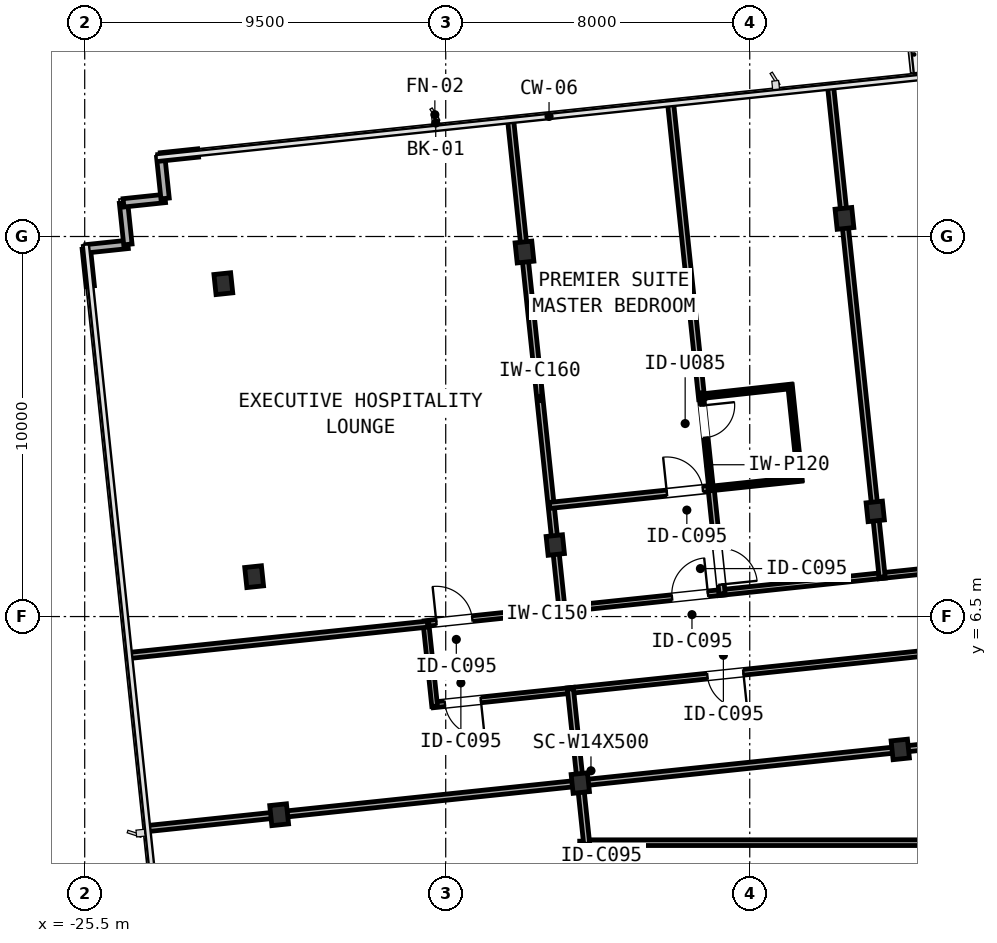
"""IFC4 building model, lengths in metres.
Left out: names, types, materials, properties, quantities, classifications, styles, units other than length and angle.
Written with IfcOpenShell. Run it as: python <this file> out.ifc"""

import sys

from ifc_helpers import new_model, si_unit, direction, frame, frame_2d, origin, origin_2d, place, context, subcontext, project, spatial, rectangle, i_section, extrude, element, fill, save


model = new_model("IFC4")
c1 = context("Model", 3, precision=1e-05, world=origin(), true_north=direction((0.0, 1.0)))
c2 = subcontext(c1, "Body", "Model", "MODEL_VIEW")
j1 = project(units=[si_unit("LENGTHUNIT", "METRE"), si_unit("PLANEANGLEUNIT", "RADIAN")], contexts=[c1])
p1 = place(None, origin())
s1 = spatial("IfcSite", under=j1, at=p1, CompositionType="ELEMENT")
p2 = place(p1, origin())
s2 = spatial("IfcBuilding", under=s1, at=p2, CompositionType="ELEMENT")
p3 = place(p2, frame((0.0, 0.0, 106.35)))
s3 = spatial("IfcBuildingStorey", under=s2, at=p3, CompositionType="ELEMENT", Elevation=106.35)
for number, where, z_axis, x_axis in (
    (1, (-20.383, 1.286, 0.0), (0.0, 0.0, 1.0), (0.995, 0.105, 0.0)),
    (2, (-21.042, 7.549, 0.0), (0.0, 0.0, 1.0), (0.995, 0.105, 0.0)),
    (3, (-21.852, 15.259, 0.0), (0.0, 0.0, 1.0), (0.995, 0.105, 0.0)),
):
    element("IfcColumn", number, at=place(p3, frame(where, z_axis=z_axis, x_axis=x_axis)), inside=s3, PredefinedType="COLUMN", context=c2, shape_type="SweptSolid", body=[
        extrude(i_section(OverallWidth=0.442, OverallDepth=0.531, WebThickness=0.066, FlangeThickness=0.106, FilletRadius=0.031, at=origin_2d()), origin(), (0.0, 0.0, 1.0), 3.45),
    ])
for number, where, z_axis, x_axis in (
    (4, (-12.459, 2.119, 0.0), (0.0, 0.0, 1.0), (0.995, 0.105, 0.0)),
    (5, (-13.117, 8.382, 0.0), (0.0, 0.0, 1.0), (0.995, 0.105, 0.0)),
):
    element("IfcColumn", number, at=place(p3, frame(where, z_axis=z_axis, x_axis=x_axis)), inside=s3, PredefinedType="COLUMN", context=c2, shape_type="SweptSolid", body=[
        extrude(i_section(OverallWidth=0.432, OverallDepth=0.498, WebThickness=0.056, FlangeThickness=0.089, FilletRadius=0.031, at=origin_2d()), origin(), (0.0, 0.0, 1.0), 3.45),
    ])
p4 = place(p3, frame((-13.927, 16.092, 0.0), z_axis=(0.0, 0.0, 1.0), x_axis=(0.994521895368, 0.104528463268, 0.0)))
e6 = element("IfcColumn", 6, at=p4, inside=s3, PredefinedType="COLUMN", context=c2, shape_type="SweptSolid", body=[
    extrude(i_section(OverallWidth=0.442, OverallDepth=0.531, WebThickness=0.066, FlangeThickness=0.106, FilletRadius=0.031, at=origin_2d()), origin(), (0.0, 0.0, 1.0), 3.45),
])
for number, where, z_axis, x_axis in (
    (7, (-4.039, 3.004, 0.0), (0.0, 0.0, 1.0), (0.995, 0.105, 0.0)),
    (8, (-4.698, 9.267, 0.0), (0.0, 0.0, 1.0), (0.995, 0.105, 0.0)),
):
    element("IfcColumn", number, at=place(p3, frame(where, z_axis=z_axis, x_axis=x_axis)), inside=s3, PredefinedType="COLUMN", context=c2, shape_type="SweptSolid", body=[
        extrude(i_section(OverallWidth=0.432, OverallDepth=0.498, WebThickness=0.056, FlangeThickness=0.089, FilletRadius=0.031, at=origin_2d()), origin(), (0.0, 0.0, 1.0), 3.45),
    ])
p5 = place(p3, frame((-5.508, 16.977, 0.0), z_axis=(0.0, 0.0, 1.0), x_axis=(0.994521895368, 0.104528463268, 0.0)))
e9 = element("IfcColumn", 9, at=p5, inside=s3, PredefinedType="COLUMN", context=c2, shape_type="SweptSolid", body=[
    extrude(i_section(OverallWidth=0.442, OverallDepth=0.531, WebThickness=0.066, FlangeThickness=0.106, FilletRadius=0.031, at=origin_2d()), origin(), (0.0, 0.0, 1.0), 3.45),
])
p6 = place(p3, frame((-25.354, 15.192, 0.0), z_axis=(0.0, 0.0, 1.0), x_axis=(-0.104556418955, 0.99451895671, 0.0)))
e10 = element("IfcWall", 10, at=p6, inside=s3, PredefinedType="STANDARD", context=c2, shape_type="SweptSolid", body=[
    extrude(rectangle(XDim=0.99, YDim=0.22, at=frame_2d((0.495, 0.0))), origin(), (0.0, 0.0, 1.0), 3.19),
])
p7 = place(p3, frame((-25.458, 16.177, 0.0), z_axis=(0.0, 0.0, 1.0), x_axis=(0.994521251134, 0.104534592565, 0.0)))
e11 = element("IfcWall", 11, at=p7, inside=s3, PredefinedType="STANDARD", context=c2, shape_type="SweptSolid", body=[
    extrude(rectangle(XDim=1.1, YDim=0.22, at=frame_2d((0.55, 0.0))), origin(), (0.0, 0.0, 1.0), 3.19),
])
p8 = place(p3, frame((-24.364, 16.292, 0.0), z_axis=(0.0, 0.0, 1.0), x_axis=(-0.104557671117, 0.994518825066, 0.0)))
e12 = element("IfcWall", 12, at=p8, inside=s3, PredefinedType="STANDARD", context=c2, shape_type="SweptSolid", body=[
    extrude(rectangle(XDim=1.1, YDim=0.22, at=frame_2d((0.55, 0.0))), origin(), (0.0, 0.0, 1.0), 3.19),
])
for number, where, z_axis, x_axis in (
    (13, (-24.479, 17.386, 0.0), (0.0, 0.0, 1.0), (0.995, 0.105, 0.0)),
    (14, (-23.385, 17.501, 0.0), (0.0, 0.0, 1.0), (-0.105, 0.995, 0.0)),
):
    element("IfcWall", number, at=place(p3, frame(where, z_axis=z_axis, x_axis=x_axis)), inside=s3, PredefinedType="STANDARD", context=c2, shape_type="SweptSolid", body=[
        extrude(rectangle(XDim=1.1, YDim=0.22, at=frame_2d((0.55, 0.0))), origin(), (0.0, 0.0, 1.0), 3.19),
    ])
p9 = place(p3, frame((-23.5, 18.595, 0.0), z_axis=(0.0, 0.0, 1.0), x_axis=(0.99451895671, 0.104556418955, 0.0)))
e15 = element("IfcWall", 15, at=p9, inside=s3, PredefinedType="STANDARD", context=c2, shape_type="SweptSolid", body=[
    extrude(rectangle(XDim=0.99, YDim=0.22, at=frame_2d((0.495, 0.0))), origin(), (0.0, 0.0, 1.0), 3.19),
])
p10 = place(p3, frame((-16.56, 6.313, 0.0), z_axis=(0.0, 0.0, 1.0), x_axis=(0.994525204328, 0.104496975826, 0.0)))
e16 = element("IfcWall", 16, at=p10, inside=s3, PredefinedType="PARTITIONING", context=c2, shape_type="SweptSolid", body=[
    extrude(rectangle(XDim=3.722, YDim=0.15, at=frame_2d((1.861, 0.0))), origin(), (0.0, 0.0, 1.0), 2.479),
])
p11 = place(p10, frame((0.315, 0.0, 0.0)))
e17 = element("IfcOpeningElement", 17, at=p11, cuts=e16, PredefinedType="OPENING", context=c2, shape_type="SweptSolid", body=[
    extrude(rectangle(XDim=0.95, YDim=2.15, at=frame_2d((0.475, 1.075))), frame((0.0, 0.085, 0.0), z_axis=(0.0, -1.0, 0.0), x_axis=(1.0, 0.0, 0.0)), (0.0, 0.0, 1.0), 0.17),
])
p12 = place(p3, frame((-13.021, 6.685, 0.0), z_axis=(0.0, 0.0, 1.0), x_axis=(0.9945197426, 0.104548943463, 0.0)))
e18 = element("IfcWall", 18, at=p12, inside=s3, PredefinedType="PARTITIONING", context=c2, shape_type="SweptSolid", body=[
    extrude(rectangle(XDim=4.397, YDim=0.15, at=frame_2d((2.199, 0.0))), origin(), (0.0, 0.0, 1.0), 2.479),
])
p13 = place(p12, frame((2.993, 0.0, 0.0)))
e19 = element("IfcOpeningElement", 19, at=p13, cuts=e18, PredefinedType="OPENING", context=c2, shape_type="SweptSolid", body=[
    extrude(rectangle(XDim=0.95, YDim=2.15, at=frame_2d((0.475, 1.075))), frame((0.0, 0.085, 0.0), z_axis=(0.0, -1.0, 0.0), x_axis=(1.0, 0.0, 0.0)), (0.0, 0.0, 1.0), 0.17),
])
p14 = place(p3, frame((-8.811, 7.127, 0.0), z_axis=(0.0, 0.0, 1.0), x_axis=(0.994524907824, 0.104499797695, 0.0)))
e20 = element("IfcWall", 20, at=p14, inside=s3, PredefinedType="PARTITIONING", context=c2, shape_type="SweptSolid", body=[
    extrude(rectangle(XDim=4.397, YDim=0.15, at=frame_2d((2.198, 0.0))), origin(), (0.0, 0.0, 1.0), 2.479),
])
p15 = place(p3, frame((-4.602, 7.57, 0.0), z_axis=(0.0, 0.0, 1.0), x_axis=(0.994522888708, 0.104519011838, 0.0)))
e21 = element("IfcWall", 21, at=p15, inside=s3, PredefinedType="PARTITIONING", context=c2, shape_type="SweptSolid", body=[
    extrude(rectangle(XDim=17.096, YDim=0.15, at=frame_2d((8.548, 0.0))), origin(), (0.0, 0.0, 1.0), 2.479),
])
p16 = place(p15, frame((12.361, 0.0, 0.0)))
e22 = element("IfcOpeningElement", 22, at=p16, cuts=e21, PredefinedType="OPENING", context=c2, shape_type="SweptSolid", body=[
    extrude(rectangle(XDim=0.95, YDim=2.15, at=frame_2d((0.475, 1.075))), frame((0.0, 0.085, 0.0), z_axis=(0.0, -1.0, 0.0), x_axis=(1.0, 0.0, 0.0)), (0.0, 0.0, 1.0), 0.17),
])
p17 = place(p3, frame((-12.633, 4.564, 0.0), z_axis=(0.0, 0.0, 1.0), x_axis=(-0.994525920558, -0.104490159046, 0.0)))
e23 = element("IfcWall", 23, at=p17, inside=s3, PredefinedType="PARTITIONING", context=c2, shape_type="SweptSolid", body=[
    extrude(rectangle(XDim=3.722, YDim=0.15, at=frame_2d((1.861, 0.0))), origin(), (0.0, 0.0, 1.0), 2.479),
])
p18 = place(p17, frame((2.457, 0.0, 0.0)))
e24 = element("IfcOpeningElement", 24, at=p18, cuts=e23, PredefinedType="OPENING", context=c2, shape_type="SweptSolid", body=[
    extrude(rectangle(XDim=0.95, YDim=2.15, at=frame_2d((0.475, 1.075))), frame((0.0, 0.085, 0.0), z_axis=(0.0, -1.0, 0.0), x_axis=(1.0, 0.0, 0.0)), (0.0, 0.0, 1.0), 0.17),
])
p19 = place(p3, frame((-16.291, 4.139, 0.0), z_axis=(0.0, 0.0, 1.0), x_axis=(-0.104512255544, 0.994523598735, 0.0)))
e25 = element("IfcWall", 25, at=p19, inside=s3, PredefinedType="PARTITIONING", context=c2, shape_type="SweptSolid", body=[
    extrude(rectangle(XDim=2.21, YDim=0.15, at=frame_2d((1.105, 0.0))), origin(), (0.0, 0.0, 1.0), 3.19),
])
p20 = place(p3, frame((7.26, 6.655, 0.0), z_axis=(0.0, 0.0, 1.0), x_axis=(-0.994522421445, -0.104523457861, 0.0)))
e26 = element("IfcWall", 26, at=p20, inside=s3, PredefinedType="PARTITIONING", context=c2, shape_type="SweptSolid", body=[
    extrude(rectangle(XDim=20.167, YDim=0.15, at=frame_2d((10.083, 0.0))), origin(), (0.0, 0.0, 1.0), 2.479),
])
p21 = place(p20, frame((15.514, 0.0, 0.0)))
e27 = element("IfcOpeningElement", 27, at=p21, cuts=e26, PredefinedType="OPENING", context=c2, shape_type="SweptSolid", body=[
    extrude(rectangle(XDim=0.95, YDim=2.15, at=frame_2d((0.475, 1.075))), frame((0.0, 0.085, 0.0), z_axis=(0.0, -1.0, 0.0), x_axis=(1.0, 0.0, 0.0)), (0.0, 0.0, 1.0), 0.17),
])
p22 = place(p3, frame((-12.376, 0.55, 0.0), z_axis=(0.0, 0.0, 1.0), x_axis=(1.0, 0.0, 0.0)))
e28 = element("IfcWall", 28, at=p22, inside=s3, PredefinedType="PARTITIONING", context=c2, shape_type="SweptSolid", body=[
    extrude(rectangle(XDim=20.278, YDim=0.15, at=frame_2d((10.139, 0.0))), origin(), (0.0, 0.0, 1.0), 2.479),
])
p23 = place(p22, frame((12.209, 0.0, 0.0)))
e29 = element("IfcOpeningElement", 29, at=p23, cuts=e28, PredefinedType="OPENING", context=c2, shape_type="SweptSolid", body=[
    extrude(rectangle(XDim=0.95, YDim=2.15, at=frame_2d((0.475, 1.075))), frame((0.0, 0.085, 0.0), z_axis=(0.0, -1.0, 0.0), x_axis=(1.0, 0.0, 0.0)), (0.0, 0.0, 1.0), 0.17),
])
p24 = place(p3, frame((-12.4, -2.19, 0.0), z_axis=(0.0, 0.0, 1.0), x_axis=(0.0, 1.0, 0.0)))
e30 = element("IfcWall", 30, at=p24, inside=s3, PredefinedType="PARTITIONING", context=c2, shape_type="SweptSolid", body=[
    extrude(rectangle(XDim=2.78, YDim=0.15, at=frame_2d((1.39, 0.0))), origin(), (0.0, 0.0, 1.0), 2.225),
])
p25 = place(p24, frame((0.348, 0.0, 0.0)))
e31 = element("IfcOpeningElement", 31, at=p25, cuts=e30, PredefinedType="OPENING", context=c2, shape_type="SweptSolid", body=[
    extrude(rectangle(XDim=0.95, YDim=2.15, at=frame_2d((0.475, 1.075))), frame((0.0, 0.085, 0.0), z_axis=(0.0, -1.0, 0.0), x_axis=(1.0, 0.0, 0.0)), (0.0, 0.0, 1.0), 0.17),
])
p26 = place(p3, frame((-13.909, 15.917, 0.0), z_axis=(0.0, 0.0, 1.0), x_axis=(0.104523341075, -0.994522433719, 0.0)))
e32 = element("IfcWall", 32, at=p26, inside=s3, PredefinedType="PARTITIONING", context=c2, shape_type="SweptSolid", body=[
    extrude(rectangle(XDim=7.4, YDim=0.16, at=frame_2d((3.7, 0.0))), origin(), (0.0, 0.0, 1.0), 2.479),
])
p27 = place(p3, frame((-13.099, 8.207, 0.0), z_axis=(0.0, 0.0, 1.0), x_axis=(0.104578999325, -0.994516582516, 0.0)))
e33 = element("IfcWall", 33, at=p27, inside=s3, PredefinedType="PARTITIONING", context=c2, shape_type="SweptSolid", body=[
    extrude(rectangle(XDim=1.562, YDim=0.16, at=frame_2d((0.781, 0.0))), origin(), (0.0, 0.0, 1.0), 2.479),
])
p28 = place(p3, frame((-14.295, 19.592, 0.0), z_axis=(0.0, 0.0, 1.0), x_axis=(0.10455555946, -0.99451904707, 0.0)))
e34 = element("IfcWall", 34, at=p28, inside=s3, PredefinedType="PARTITIONING", context=c2, shape_type="SweptSolid", body=[
    extrude(rectangle(XDim=3.344, YDim=0.16, at=frame_2d((1.672, 0.0))), origin(), (0.0, 0.0, 1.0), 3.19),
])
p29 = place(p3, frame((-16.478, 6.302, 0.0), z_axis=(0.0, 0.0, 1.0), x_axis=(-0.994519786396, -0.104548526856, 0.0)))
e35 = element("IfcWall", 35, at=p29, inside=s3, PredefinedType="PARTITIONING", context=c2, shape_type="SweptSolid", body=[
    extrude(rectangle(XDim=7.928, YDim=0.16, at=frame_2d((3.964, 0.0))), origin(), (0.0, 0.0, 1.0), 2.553),
])
p30 = place(p3, frame((-13.267, 9.424, 0.0), z_axis=(0.0, 0.0, 1.0), x_axis=(0.994519401846, 0.104552184826, 0.0)))
e36 = element("IfcWall", 36, at=p30, inside=s3, PredefinedType="PARTITIONING", context=c2, shape_type="SweptSolid", body=[
    extrude(rectangle(XDim=4.313, YDim=0.16, at=frame_2d((2.156, 0.0))), origin(), (0.0, 0.0, 1.0), 2.479),
])
p31 = place(p30, frame((3.104, 0.0, 0.0)))
e37 = element("IfcOpeningElement", 37, at=p31, cuts=e36, PredefinedType="OPENING", context=c2, shape_type="SweptSolid", body=[
    extrude(rectangle(XDim=0.95, YDim=2.15, at=frame_2d((0.475, 1.075))), frame((0.0, 0.09, 0.0), z_axis=(0.0, -1.0, 0.0), x_axis=(1.0, 0.0, 0.0)), (0.0, 0.0, 1.0), 0.18),
])
p32 = place(p3, frame((-9.021, 9.911, 0.0), z_axis=(0.0, 0.0, 1.0), x_axis=(0.104559042439, -0.994518680892, 0.0)))
e38 = element("IfcWall", 38, at=p32, inside=s3, PredefinedType="PARTITIONING", context=c2, shape_type="SweptSolid", body=[
    extrude(rectangle(XDim=2.83, YDim=0.16, at=frame_2d((1.415, 0.0))), origin(), (0.0, 0.0, 1.0), 2.479),
])
p33 = place(p32, frame((1.633, 0.0, 0.0)))
e39 = element("IfcOpeningElement", 39, at=p33, cuts=e38, PredefinedType="OPENING", context=c2, shape_type="SweptSolid", body=[
    extrude(rectangle(XDim=0.95, YDim=2.15, at=frame_2d((0.475, 1.075))), frame((0.0, 0.09, 0.0), z_axis=(0.0, -1.0, 0.0), x_axis=(1.0, 0.0, 0.0)), (0.0, 0.0, 1.0), 0.18),
])
p34 = place(p3, frame((-10.085, 20.035, 0.0), z_axis=(0.0, 0.0, 1.0), x_axis=(0.104523139328, -0.994522454922, 0.0)))
e40 = element("IfcWall", 40, at=p34, inside=s3, PredefinedType="PARTITIONING", context=c2, shape_type="SweptSolid", body=[
    extrude(rectangle(XDim=7.862, YDim=0.16, at=frame_2d((3.931, 0.0))), origin(), (0.0, 0.0, 1.0), 2.553),
])
p35 = place(p3, frame((-9.282, 12.389, 0.0), z_axis=(0.0, 0.0, 1.0), x_axis=(0.104605724594, -0.994513771841, 0.0)))
e41 = element("IfcWall", 41, at=p35, inside=s3, PredefinedType="PARTITIONING", context=c2, shape_type="SweptSolid", body=[
    extrude(rectangle(XDim=2.572, YDim=0.12, at=frame_2d((1.286, 0.0))), origin(), (0.0, 0.0, 1.0), 2.718),
])
p36 = place(p35, frame((0.338, 0.0, 0.0)))
e42 = element("IfcOpeningElement", 42, at=p36, cuts=e41, PredefinedType="OPENING", context=c2, shape_type="SweptSolid", body=[
    extrude(rectangle(XDim=0.85, YDim=2.1, at=frame_2d((0.425, 1.05))), frame((0.0, 0.07, 0.0), z_axis=(0.0, -1.0, 0.0), x_axis=(1.0, 0.0, 0.0)), (0.0, 0.0, 1.0), 0.14),
])
p37 = place(p3, frame((-9.057, 9.867, 0.0), z_axis=(0.0, 0.0, 1.0), x_axis=(0.994526352295, 0.104486049741, 0.0)))
e43 = element("IfcWall", 43, at=p37, inside=s3, PredefinedType="PARTITIONING", context=c2, shape_type="SweptSolid", body=[
    extrude(rectangle(XDim=2.43, YDim=0.12, at=frame_2d((1.215, 0.0))), origin(), (0.0, 0.0, 1.0), 2.718),
])
p38 = place(p3, frame((-6.676, 10.077, 0.0), z_axis=(0.0, 0.0, 1.0), x_axis=(-0.104508968707, 0.994523944136, 0.0)))
e44 = element("IfcWall", 44, at=p38, inside=s3, PredefinedType="PARTITIONING", context=c2, shape_type="SweptSolid", body=[
    extrude(rectangle(XDim=2.53, YDim=0.12, at=frame_2d((1.265, 0.0))), origin(), (0.0, 0.0, 1.0), 3.19),
])
p39 = place(p3, frame((-6.896, 12.557, 0.0), z_axis=(0.0, 0.0, 1.0), x_axis=(-0.994073388392, -0.108711078051, 0.0)))
e45 = element("IfcWall", 45, at=p39, inside=s3, PredefinedType="PARTITIONING", context=c2, shape_type="SweptSolid", body=[
    extrude(rectangle(XDim=2.43, YDim=0.12, at=frame_2d((1.215, 0.0))), origin(), (0.0, 0.0, 1.0), 2.718),
])
p40 = place(p3, frame((-5.876, 20.477, 0.0), z_axis=(0.0, 0.0, 1.0), x_axis=(0.10455555946, -0.99451904707, 0.0)))
e46 = element("IfcWall", 46, at=p40, inside=s3, PredefinedType="PARTITIONING", context=c2, shape_type="SweptSolid", body=[
    extrude(rectangle(XDim=3.344, YDim=0.16, at=frame_2d((1.672, 0.0))), origin(), (0.0, 0.0, 1.0), 3.19),
])
p41 = place(p3, frame((-5.489, 16.801, 0.0), z_axis=(0.0, 0.0, 1.0), x_axis=(0.104526770886, -0.994522073243, 0.0)))
e47 = element("IfcWall", 47, at=p41, inside=s3, PredefinedType="PARTITIONING", context=c2, shape_type="SweptSolid", body=[
    extrude(rectangle(XDim=7.399, YDim=0.16, at=frame_2d((3.7, 0.0))), origin(), (0.0, 0.0, 1.0), 2.479),
])
p42 = place(p3, frame((-4.679, 9.092, 0.0), z_axis=(0.0, 0.0, 1.0), x_axis=(0.104424383811, -0.994532829054, 0.0)))
e48 = element("IfcWall", 48, at=p42, inside=s3, PredefinedType="PARTITIONING", context=c2, shape_type="SweptSolid", body=[
    extrude(rectangle(XDim=1.562, YDim=0.16, at=frame_2d((0.781, 0.0))), origin(), (0.0, 0.0, 1.0), 2.479),
])
p43 = place(p3, frame((-12.719, 4.595, 0.0), z_axis=(0.0, 0.0, 1.0), x_axis=(0.104569435529, -0.994517588157, 0.0)))
e49 = element("IfcWall", 49, at=p43, inside=s3, PredefinedType="PARTITIONING", context=c2, shape_type="SweptSolid", body=[
    extrude(rectangle(XDim=2.314, YDim=0.16, at=frame_2d((1.157, 0.0))), origin(), (0.0, 0.0, 1.0), 2.479),
])
p44 = place(p3, frame((-20.558, 1.267, 0.0), z_axis=(0.0, 0.0, 1.0), x_axis=(-0.99451904707, -0.10455555946, 0.0)))
e50 = element("IfcWall", 50, at=p44, inside=s3, PredefinedType="PARTITIONING", context=c2, shape_type="SweptSolid", body=[
    extrude(rectangle(XDim=3.344, YDim=0.16, at=frame_2d((1.672, 0.0))), origin(), (0.0, 0.0, 1.0), 3.19),
])
p45 = place(p3, frame((-12.634, 2.1, 0.0), z_axis=(0.0, 0.0, 1.0), x_axis=(-0.994524056968, -0.104507894972, 0.0)))
e51 = element("IfcWall", 51, at=p45, inside=s3, PredefinedType="PARTITIONING", context=c2, shape_type="SweptSolid", body=[
    extrude(rectangle(XDim=7.616, YDim=0.16, at=frame_2d((3.808, 0.0))), origin(), (0.0, 0.0, 1.0), 2.479),
])
p46 = place(p3, frame((-4.214, 2.985, 0.0), z_axis=(0.0, 0.0, 1.0), x_axis=(-0.994521269983, -0.104534413238, 0.0)))
e52 = element("IfcWall", 52, at=p46, inside=s3, PredefinedType="PARTITIONING", context=c2, shape_type="SweptSolid", body=[
    extrude(rectangle(XDim=8.114, YDim=0.16, at=frame_2d((4.057, 0.0))), origin(), (0.0, 0.0, 1.0), 2.479),
])
p47 = place(p3, frame((4.205, 3.87, 0.0), z_axis=(0.0, 0.0, 1.0), x_axis=(-0.994521598781, -0.104531285071, 0.0)))
e53 = element("IfcWall", 53, at=p47, inside=s3, PredefinedType="PARTITIONING", context=c2, shape_type="SweptSolid", body=[
    extrude(rectangle(XDim=8.114, YDim=0.16, at=frame_2d((4.057, 0.0))), origin(), (0.0, 0.0, 1.0), 2.479),
])
p48 = place(p3, frame((-12.29, 0.51, 0.0), z_axis=(0.0, 0.0, 1.0), x_axis=(-0.104534854339, 0.994521223619, 0.0)))
e54 = element("IfcWall", 54, at=p48, inside=s3, PredefinedType="PARTITIONING", context=c2, shape_type="SweptSolid", body=[
    extrude(rectangle(XDim=1.441, YDim=0.16, at=frame_2d((0.72, 0.0))), origin(), (0.0, 0.0, 1.0), 2.479),
])
p49 = place(p11, frame((0.95, 0.0, 0.0), z_axis=(0.0, 0.0, 1.0), x_axis=(-1.0, 0.0, 0.0)))
e55 = element("IfcDoor", 55, at=p49, inside=s3, OperationType="SINGLE_SWING_LEFT", PredefinedType="DOOR", context=c2, shape_type="SweptSolid", body=[
    extrude(rectangle(XDim=0.95, YDim=2.15, at=frame_2d((0.475, 1.075))), frame((0.0, 0.025, 0.0), z_axis=(0.0, -1.0, 0.0), x_axis=(1.0, 0.0, 0.0)), (0.0, 0.0, 1.0), 0.05),
])
fill(e17, e55)
p50 = place(p13, frame((0.95, 0.0, 0.0), z_axis=(0.0, 0.0, 1.0), x_axis=(-1.0, 0.0, 0.0)))
e56 = element("IfcDoor", 56, at=p50, inside=s3, OperationType="SINGLE_SWING_RIGHT", PredefinedType="DOOR", context=c2, shape_type="SweptSolid", body=[
    extrude(rectangle(XDim=0.95, YDim=2.15, at=frame_2d((0.475, 1.075))), frame((0.0, 0.025, 0.0), z_axis=(0.0, -1.0, 0.0), x_axis=(1.0, 0.0, 0.0)), (0.0, 0.0, 1.0), 0.05),
])
fill(e19, e56)
p51 = place(p31, origin())
e57 = element("IfcDoor", 57, at=p51, inside=s3, OperationType="SINGLE_SWING_LEFT", PredefinedType="DOOR", context=c2, shape_type="SweptSolid", body=[
    extrude(rectangle(XDim=0.95, YDim=2.15, at=frame_2d((0.475, 1.075))), frame((0.0, 0.025, 0.0), z_axis=(0.0, -1.0, 0.0), x_axis=(1.0, 0.0, 0.0)), (0.0, 0.0, 1.0), 0.05),
])
fill(e37, e57)
p52 = place(p33, frame((0.95, 0.0, 0.0), z_axis=(0.0, 0.0, 1.0), x_axis=(-1.0, 0.0, 0.0)))
e58 = element("IfcDoor", 58, at=p52, inside=s3, OperationType="SINGLE_SWING_RIGHT", PredefinedType="DOOR", context=c2, shape_type="SweptSolid", body=[
    extrude(rectangle(XDim=0.95, YDim=2.15, at=frame_2d((0.475, 1.075))), frame((0.0, 0.025, 0.0), z_axis=(0.0, -1.0, 0.0), x_axis=(1.0, 0.0, 0.0)), (0.0, 0.0, 1.0), 0.05),
])
fill(e39, e58)
p53 = place(p36, frame((0.85, 0.0, 0.0), z_axis=(0.0, 0.0, 1.0), x_axis=(-1.0, 0.0, 0.0)))
e59 = element("IfcDoor", 59, at=p53, inside=s3, OperationType="SINGLE_SWING_LEFT", PredefinedType="DOOR", context=c2, shape_type="SweptSolid", body=[
    extrude(rectangle(XDim=0.85, YDim=2.1, at=frame_2d((0.425, 1.05))), frame((0.0, 0.025, 0.0), z_axis=(0.0, -1.0, 0.0), x_axis=(1.0, 0.0, 0.0)), (0.0, 0.0, 1.0), 0.05),
])
fill(e42, e59)
p54 = place(p18, frame((0.95, 0.0, 0.0), z_axis=(0.0, 0.0, 1.0), x_axis=(-1.0, 0.0, 0.0)))
e60 = element("IfcDoor", 60, at=p54, inside=s3, OperationType="SINGLE_SWING_LEFT", PredefinedType="DOOR", context=c2, shape_type="SweptSolid", body=[
    extrude(rectangle(XDim=0.95, YDim=2.15, at=frame_2d((0.475, 1.075))), frame((0.0, 0.025, 0.0), z_axis=(0.0, -1.0, 0.0), x_axis=(1.0, 0.0, 0.0)), (0.0, 0.0, 1.0), 0.05),
])
fill(e24, e60)
p55 = place(p21, frame((0.95, 0.0, 0.0), z_axis=(0.0, 0.0, 1.0), x_axis=(-1.0, 0.0, 0.0)))
e61 = element("IfcDoor", 61, at=p55, inside=s3, OperationType="SINGLE_SWING_LEFT", PredefinedType="DOOR", context=c2, shape_type="SweptSolid", body=[
    extrude(rectangle(XDim=0.95, YDim=2.15, at=frame_2d((0.475, 1.075))), frame((0.0, 0.025, 0.0), z_axis=(0.0, -1.0, 0.0), x_axis=(1.0, 0.0, 0.0)), (0.0, 0.0, 1.0), 0.05),
])
fill(e27, e61)
save(model, sys.argv[1])
